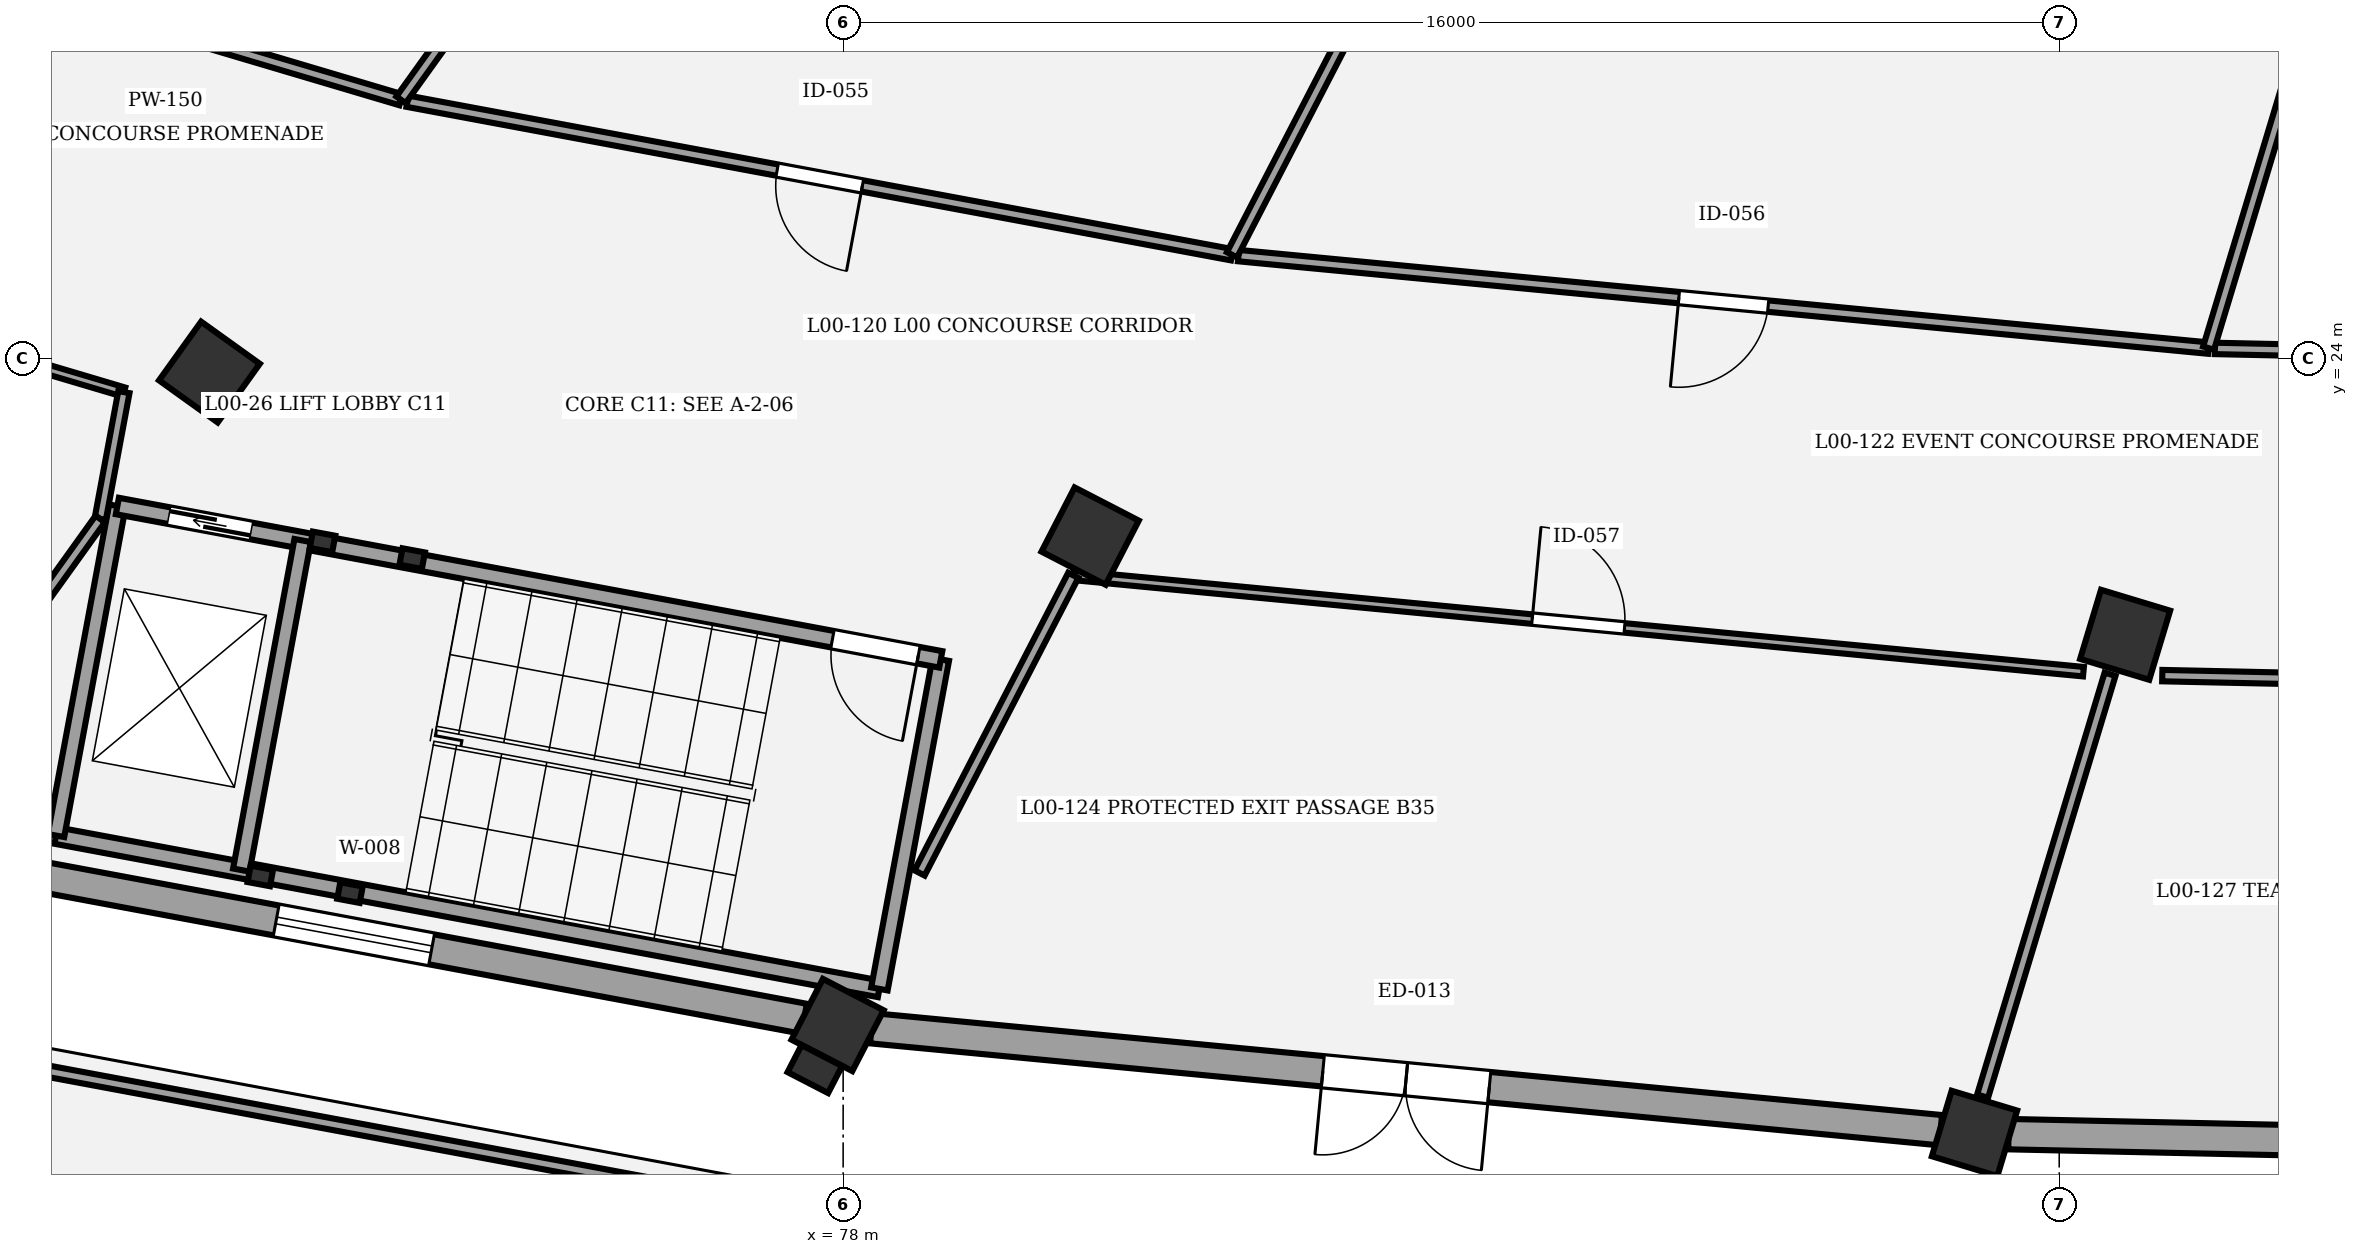
"""IFC4 building model, lengths in metres.
Left out: names, types, materials, properties, quantities, classifications, styles, units other than length and angle.
Written with IfcOpenShell. Run it as: python <this file> out.ifc"""

import sys

from ifc_helpers import new_model, si_unit, direction, frame, frame_2d, origin, origin_2d, place, context, subcontext, project, spatial, rectangle, extrude, element, fill, save


model = new_model("IFC4")
c1 = context("Model", 3, precision=1e-05, world=origin(), true_north=direction((0.0, 1.0)))
c2 = subcontext(c1, "Body", "Model", "MODEL_VIEW")
j1 = project(units=[si_unit("LENGTHUNIT", "METRE"), si_unit("PLANEANGLEUNIT", "RADIAN")], contexts=[c1])
p1 = place(None, origin())
s1 = spatial("IfcSite", under=j1, at=p1, CompositionType="ELEMENT")
p2 = place(p1, origin())
s2 = spatial("IfcBuilding", under=s1, at=p2, CompositionType="ELEMENT")
p3 = place(p2, origin())
s3 = spatial("IfcBuildingStorey", under=s2, at=p3, CompositionType="ELEMENT", Elevation=0.0)
for number, where, z_axis, x_axis in (
    (1, (69.662, 23.823, 0.0), (0.0, 0.0, 1.0), (-0.583, -0.812, 0.0)),
    (2, (81.25, 21.665, 0.0), (0.0, 0.0, 1.0), (-0.459, -0.888, 0.0)),
):
    element("IfcColumn", number, at=place(p3, frame(where, z_axis=z_axis, x_axis=x_axis)), inside=s3, PredefinedType="COLUMN", context=c2, shape_type="SweptSolid", body=[
        extrude(rectangle(XDim=0.95, YDim=0.95, at=origin_2d()), origin(), (0.0, 0.0, 1.0), 5.4),
    ])
p4 = place(p3, frame((77.927, 15.233, 0.0), z_axis=(0.0, 0.0, 1.0), x_axis=(-0.458959712465, -0.888457079624, 0.0)))
e3 = element("IfcColumn", 3, at=p4, inside=s3, PredefinedType="COLUMN", context=c2, shape_type="SweptSolid", body=[
    extrude(rectangle(XDim=0.9, YDim=0.9, at=origin_2d()), origin(), (0.0, 0.0, 1.0), 5.4),
])
p5 = place(p3, frame((77.627, 14.652, 0.0), z_axis=(0.0, 0.0, 1.0), x_axis=(0.888457079624, -0.458959712465, 0.0)))
e4 = element("IfcColumn", 4, at=p5, inside=s3, PredefinedType="PILASTER", context=c2, shape_type="SweptSolid", body=[
    extrude(rectangle(XDim=0.6, YDim=0.4, at=origin_2d()), origin(), (0.0, 0.0, 1.0), 5.4),
])
p6 = place(p3, frame((94.867, 20.366, 0.0), z_axis=(0.0, 0.0, 1.0), x_axis=(-0.289198876314, -0.957269037387, 0.0)))
e5 = element("IfcColumn", 5, at=p6, inside=s3, PredefinedType="COLUMN", context=c2, shape_type="SweptSolid", body=[
    extrude(rectangle(XDim=0.95, YDim=0.95, at=origin_2d()), origin(), (0.0, 0.0, 1.0), 5.4),
])
p7 = place(p3, frame((92.885, 13.806, 0.0), z_axis=(0.0, 0.0, 1.0), x_axis=(-0.289198876314, -0.957269037387, 0.0)))
e6 = element("IfcColumn", 6, at=p7, inside=s3, PredefinedType="COLUMN", context=c2, shape_type="SweptSolid", body=[
    extrude(rectangle(XDim=0.9, YDim=0.9, at=origin_2d()), origin(), (0.0, 0.0, 1.0), 5.4),
])
p8 = place(p3, frame((77.487, 15.315, 0.0), z_axis=(0.0, 0.0, 1.0), x_axis=(-0.983098943476, 0.183075031985, 0.0)))
e7 = element("IfcWall", 7, at=p8, inside=s3, PredefinedType="STANDARD", context=c2, shape_type="SweptSolid", body=[
    extrude(rectangle(XDim=12.051, YDim=0.4, at=frame_2d((6.026, 0.0))), origin(), (0.0, 0.0, 1.0), 4.25),
])
p9 = place(p8, frame((4.986, 0.0, 1.1)))
e8 = element("IfcOpeningElement", 8, at=p9, cuts=e7, PredefinedType="OPENING", context=c2, shape_type="SweptSolid", body=[
    extrude(rectangle(XDim=2.08, YDim=1.55, at=frame_2d((1.04, 0.775))), frame((0.0, 0.21, 0.0), z_axis=(0.0, -1.0, 0.0), x_axis=(1.0, 0.0, 0.0)), (0.0, 0.0, 1.0), 0.42),
])
p10 = place(p3, frame((92.439, 13.849, 0.0), z_axis=(0.0, 0.0, 1.0), x_axis=(-0.995482650467, 0.094943628644, 0.0)))
e9 = element("IfcWall", 9, at=p10, inside=s3, PredefinedType="STANDARD", context=c2, shape_type="SweptSolid", body=[
    extrude(rectangle(XDim=14.13, YDim=0.4, at=frame_2d((7.065, 0.0))), origin(), (0.0, 0.0, 1.0), 4.25),
])
p11 = place(p10, frame((5.965, 0.0, 0.0)))
e10 = element("IfcOpeningElement", 10, at=p11, cuts=e9, PredefinedType="OPENING", context=c2, shape_type="SweptSolid", body=[
    extrude(rectangle(XDim=2.2, YDim=2.5, at=frame_2d((1.1, 1.25))), frame((0.0, 0.21, 0.0), z_axis=(0.0, -1.0, 0.0), x_axis=(1.0, 0.0, 0.0)), (0.0, 0.0, 1.0), 0.42),
])
p12 = place(p3, frame((114.552, 13.34, 0.0), z_axis=(0.0, 0.0, 1.0), x_axis=(-0.999768115817, 0.021534033422, 0.0)))
e11 = element("IfcWall", 11, at=p12, inside=s3, PredefinedType="STANDARD", context=c2, shape_type="SweptSolid", body=[
    extrude(rectangle(XDim=21.224, YDim=0.4, at=frame_2d((10.612, 0.0))), origin(), (0.0, 0.0, 1.0), 4.25),
])
p13 = place(p12, frame((9.412, 0.0, 0.0)))
e12 = element("IfcOpeningElement", 12, at=p13, cuts=e11, PredefinedType="OPENING", context=c2, shape_type="SweptSolid", body=[
    extrude(rectangle(XDim=2.4, YDim=2.55, at=frame_2d((1.2, 1.275))), frame((0.0, 0.21, 0.0), z_axis=(0.0, -1.0, 0.0), x_axis=(1.0, 0.0, 0.0)), (0.0, 0.0, 1.0), 0.42),
])
for number, where, z_axis, x_axis in (
    (13, (72.33, 21.369, 0.0), (0.0, 0.0, 1.0), (-0.983, 0.183, 0.0)),
    (14, (71.15, 21.588, 0.0), (0.0, 0.0, 1.0), (-0.983, 0.183, 0.0)),
    (15, (70.332, 17.194, 0.0), (0.0, 0.0, 1.0), (-0.983, 0.183, 0.0)),
    (16, (71.511, 16.974, 0.0), (0.0, 0.0, 1.0), (-0.983, 0.183, 0.0)),
):
    element("IfcColumn", number, at=place(p3, frame(where, z_axis=z_axis, x_axis=x_axis)), inside=s3, PredefinedType="COLUMN", context=c2, shape_type="SweptSolid", body=[
        extrude(rectangle(XDim=0.3, YDim=0.22, at=origin_2d()), origin(), (0.0, 0.0, 1.0), 5.4),
    ])
p14 = place(p3, frame((78.477, 15.707, 0.0), z_axis=(0.0, 0.0, 1.0), x_axis=(-0.983093434234, 0.183104613723, 0.0)))
e17 = element("IfcWall", 17, at=p14, inside=s3, PredefinedType="SHEAR", context=c2, shape_type="SweptSolid", body=[
    extrude(rectangle(XDim=11.02, YDim=0.22, at=frame_2d((5.51, 0.0))), origin(), (0.0, 0.0, 1.0), 5.15),
])
for number, where, z_axis, x_axis in (
    (18, (79.285, 20.043, 0.0), (0.0, 0.0, 1.0), (-0.183, -0.983, 0.0)),
    (19, (68.451, 22.061, 0.0), (0.0, 0.0, 1.0), (-0.183, -0.983, 0.0)),
):
    element("IfcWall", number, at=place(p3, frame(where, z_axis=z_axis, x_axis=x_axis)), inside=s3, PredefinedType="SHEAR", context=c2, shape_type="SweptSolid", body=[
        extrude(rectangle(XDim=4.41, YDim=0.22, at=frame_2d((2.205, 0.0))), origin(), (0.0, 0.0, 1.0), 5.15),
    ])
p15 = place(p3, frame((79.285, 20.043, 0.0), z_axis=(0.0, 0.0, 1.0), x_axis=(-0.983093434234, 0.183104613723, 0.0)))
e20 = element("IfcWall", 20, at=p15, inside=s3, PredefinedType="SHEAR", context=c2, shape_type="SweptSolid", body=[
    extrude(rectangle(XDim=11.02, YDim=0.22, at=frame_2d((5.51, 0.0))), origin(), (0.0, 0.0, 1.0), 5.15),
])
p16 = place(p15, frame((0.3, 0.0, 0.0)))
e21 = element("IfcOpeningElement", 21, at=p16, cuts=e20, PredefinedType="OPENING", context=c2, shape_type="SweptSolid", body=[
    extrude(rectangle(XDim=1.15, YDim=2.15, at=frame_2d((0.575, 1.075))), frame((0.0, 0.12, 0.0), z_axis=(0.0, -1.0, 0.0), x_axis=(1.0, 0.0, 0.0)), (0.0, 0.0, 1.0), 0.24),
])
p17 = place(p15, frame((9.23, 0.0, 0.0)))
e22 = element("IfcOpeningElement", 22, at=p17, cuts=e20, PredefinedType="OPENING", context=c2, shape_type="SweptSolid", body=[
    extrude(rectangle(XDim=1.1, YDim=2.15, at=frame_2d((0.55, 1.075))), frame((0.0, 0.12, 0.0), z_axis=(0.0, -1.0, 0.0), x_axis=(1.0, 0.0, 0.0)), (0.0, 0.0, 1.0), 0.24),
])
p18 = place(p3, frame((70.889, 21.606, 0.0), z_axis=(0.0, 0.0, 1.0), x_axis=(-0.183078394814, -0.983098317236, 0.0)))
e23 = element("IfcWall", 23, at=p18, inside=s3, PredefinedType="SHEAR", context=c2, shape_type="SweptSolid", body=[
    extrude(rectangle(XDim=4.41, YDim=0.22, at=frame_2d((2.205, 0.0))), origin(), (0.0, 0.0, 1.0), 5.15),
])
p19 = place(p3, frame((72.183, 27.404, 0.0), z_axis=(0.0, 0.0, 1.0), x_axis=(-0.958655809656, 0.284568161629, 0.0)))
e24 = element("IfcWall", 24, at=p19, inside=s3, PredefinedType="PARTITIONING", context=c2, shape_type="SweptSolid", body=[
    extrude(rectangle(XDim=9.891, YDim=0.15, at=frame_2d((4.946, 0.0))), origin(), (0.0, 0.0, 1.0), 4.15),
])
p20 = place(p19, frame((5.644, 0.0, 0.0)))
e25 = element("IfcOpeningElement", 25, at=p20, cuts=e24, PredefinedType="OPENING", context=c2, shape_type="SweptSolid", body=[
    extrude(rectangle(XDim=1.06, YDim=2.2, at=frame_2d((0.53, 1.1))), frame((0.0, 0.085, 0.0), z_axis=(0.0, -1.0, 0.0), x_axis=(1.0, 0.0, 0.0)), (0.0, 0.0, 1.0), 0.17),
])
p21 = place(p3, frame((59.134, 26.35, 0.0), z_axis=(0.0, 0.0, 1.0), x_axis=(0.958661401763, -0.284549322211, 0.0)))
e26 = element("IfcWall", 26, at=p21, inside=s3, PredefinedType="PARTITIONING", context=c2, shape_type="SweptSolid", body=[
    extrude(rectangle(XDim=9.809, YDim=0.125, at=frame_2d((4.904, 0.0))), origin(), (0.0, 0.0, 1.0), 4.15),
])
p22 = place(p21, frame((5.564, 0.0, 0.0)))
e27 = element("IfcOpeningElement", 27, at=p22, cuts=e26, PredefinedType="OPENING", context=c2, shape_type="SweptSolid", body=[
    extrude(rectangle(XDim=1.1, YDim=2.2, at=frame_2d((0.55, 1.1))), frame((0.0, 0.073, 0.0), z_axis=(0.0, -1.0, 0.0), x_axis=(1.0, 0.0, 0.0)), (0.0, 0.0, 1.0), 0.145),
])
p23 = place(p3, frame((83.116, 25.365, 0.0), z_axis=(0.0, 0.0, 1.0), x_axis=(-0.983097372707, 0.183083466695, 0.0)))
e28 = element("IfcWall", 28, at=p23, inside=s3, PredefinedType="PARTITIONING", context=c2, shape_type="SweptSolid", body=[
    extrude(rectangle(XDim=11.035, YDim=0.15, at=frame_2d((5.517, 0.0))), origin(), (0.0, 0.0, 1.0), 4.15),
])
p24 = place(p23, frame((4.947, 0.0, 0.0)))
e29 = element("IfcOpeningElement", 29, at=p24, cuts=e28, PredefinedType="OPENING", context=c2, shape_type="SweptSolid", body=[
    extrude(rectangle(XDim=1.14, YDim=2.2, at=frame_2d((0.57, 1.1))), frame((0.0, 0.085, 0.0), z_axis=(0.0, -1.0, 0.0), x_axis=(1.0, 0.0, 0.0)), (0.0, 0.0, 1.0), 0.17),
])
p25 = place(p3, frame((95.965, 24.138, 0.0), z_axis=(0.0, 0.0, 1.0), x_axis=(-0.995485111947, 0.094917816515, 0.0)))
e30 = element("IfcWall", 30, at=p25, inside=s3, PredefinedType="PARTITIONING", context=c2, shape_type="SweptSolid", body=[
    extrude(rectangle(XDim=12.822, YDim=0.15, at=frame_2d((6.411, 0.0))), origin(), (0.0, 0.0, 1.0), 4.15),
])
p26 = place(p25, frame((5.821, 0.0, 0.0)))
e31 = element("IfcOpeningElement", 31, at=p26, cuts=e30, PredefinedType="OPENING", context=c2, shape_type="SweptSolid", body=[
    extrude(rectangle(XDim=1.18, YDim=2.2, at=frame_2d((0.59, 1.1))), frame((0.0, 0.085, 0.0), z_axis=(0.0, -1.0, 0.0), x_axis=(1.0, 0.0, 0.0)), (0.0, 0.0, 1.0), 0.17),
])
p27 = place(p3, frame((81.028, 21.148, 0.0), z_axis=(0.0, 0.0, 1.0), x_axis=(0.995484535327, -0.094923863827, 0.0)))
e32 = element("IfcWall", 32, at=p27, inside=s3, PredefinedType="PARTITIONING", context=c2, shape_type="SweptSolid", body=[
    extrude(rectangle(XDim=13.351, YDim=0.125, at=frame_2d((6.676, 0.0))), origin(), (0.0, 0.0, 1.0), 4.15),
])
p28 = place(p27, frame((6.065, 0.0, 0.0)))
e33 = element("IfcOpeningElement", 33, at=p28, cuts=e32, PredefinedType="OPENING", context=c2, shape_type="SweptSolid", body=[
    extrude(rectangle(XDim=1.22, YDim=2.2, at=frame_2d((0.61, 1.1))), frame((0.0, 0.073, 0.0), z_axis=(0.0, -1.0, 0.0), x_axis=(1.0, 0.0, 0.0)), (0.0, 0.0, 1.0), 0.145),
])
p29 = place(p3, frame((114.96, 23.726, 0.0), z_axis=(0.0, 0.0, 1.0), x_axis=(-0.999768266483, 0.021527037261, 0.0)))
e34 = element("IfcWall", 34, at=p29, inside=s3, PredefinedType="PARTITIONING", context=c2, shape_type="SweptSolid", body=[
    extrude(rectangle(XDim=18.917, YDim=0.15, at=frame_2d((9.458, 0.0))), origin(), (0.0, 0.0, 1.0), 4.15),
])
p30 = place(p29, frame((8.829, 0.0, 0.0)))
e35 = element("IfcOpeningElement", 35, at=p30, cuts=e34, PredefinedType="OPENING", context=c2, shape_type="SweptSolid", body=[
    extrude(rectangle(XDim=1.26, YDim=2.2, at=frame_2d((0.63, 1.1))), frame((0.0, 0.085, 0.0), z_axis=(0.0, -1.0, 0.0), x_axis=(1.0, 0.0, 0.0)), (0.0, 0.0, 1.0), 0.17),
])
p31 = place(p3, frame((95.356, 19.829, 0.0), z_axis=(0.0, 0.0, 1.0), x_axis=(0.999768107727, -0.021534409017, 0.0)))
e36 = element("IfcWall", 36, at=p31, inside=s3, PredefinedType="PARTITIONING", context=c2, shape_type="SweptSolid", body=[
    extrude(rectangle(XDim=19.137, YDim=0.15, at=frame_2d((9.569, 0.0))), origin(), (0.0, 0.0, 1.0), 4.15),
])
p32 = place(p31, frame((8.909, 0.0, 0.0)))
e37 = element("IfcOpeningElement", 37, at=p32, cuts=e36, PredefinedType="OPENING", context=c2, shape_type="SweptSolid", body=[
    extrude(rectangle(XDim=1.32, YDim=2.2, at=frame_2d((0.66, 1.1))), frame((0.0, 0.085, 0.0), z_axis=(0.0, -1.0, 0.0), x_axis=(1.0, 0.0, 0.0)), (0.0, 0.0, 1.0), 0.17),
])
p33 = place(p3, frame((79.933, 38.204, 0.0), z_axis=(0.0, 0.0, 1.0), x_axis=(-0.583015953896, -0.812460705205, 0.0)))
e38 = element("IfcWall", 38, at=p33, inside=s3, PredefinedType="PARTITIONING", context=c2, shape_type="SweptSolid", body=[
    extrude(rectangle(XDim=13.292, YDim=0.15, at=frame_2d((6.646, 0.0))), origin(), (0.0, 0.0, 1.0), 4.15),
])
p34 = place(p3, frame((68.537, 23.559, 0.0), z_axis=(0.0, 0.0, 1.0), x_axis=(-0.183185863857, -0.983078297636, 0.0)))
e39 = element("IfcWall", 39, at=p34, inside=s3, PredefinedType="PARTITIONING", context=c2, shape_type="SweptSolid", body=[
    extrude(rectangle(XDim=1.698, YDim=0.15, at=frame_2d((0.849, 0.0))), origin(), (0.0, 0.0, 1.0), 4.15),
])
p35 = place(p3, frame((68.226, 21.89, 0.0), z_axis=(0.0, 0.0, 1.0), x_axis=(-0.583007019162, -0.812467116632, 0.0)))
e40 = element("IfcWall", 40, at=p35, inside=s3, PredefinedType="PARTITIONING", context=c2, shape_type="SweptSolid", body=[
    extrude(rectangle(XDim=4.736, YDim=0.15, at=frame_2d((2.368, 0.0))), origin(), (0.0, 0.0, 1.0), 4.15),
])
p36 = place(p3, frame((88.884, 36.53, 0.0), z_axis=(0.0, 0.0, 1.0), x_axis=(-0.45894823356, -0.88846300931, 0.0)))
e41 = element("IfcWall", 41, at=p36, inside=s3, PredefinedType="PARTITIONING", context=c2, shape_type="SweptSolid", body=[
    extrude(rectangle(XDim=12.566, YDim=0.15, at=frame_2d((6.283, 0.0))), origin(), (0.0, 0.0, 1.0), 4.15),
])
p37 = place(p3, frame((99.405, 35.522, 0.0), z_axis=(0.0, 0.0, 1.0), x_axis=(-0.289230709122, -0.957259419855, 0.0)))
e42 = element("IfcWall", 42, at=p37, inside=s3, PredefinedType="PARTITIONING", context=c2, shape_type="SweptSolid", body=[
    extrude(rectangle(XDim=11.893, YDim=0.15, at=frame_2d((5.946, 0.0))), origin(), (0.0, 0.0, 1.0), 4.15),
])
p38 = place(p3, frame((79.006, 17.233, 0.0), z_axis=(0.0, 0.0, 1.0), x_axis=(0.458942068402, 0.888466193983, 0.0)))
e43 = element("IfcWall", 43, at=p38, inside=s3, PredefinedType="PARTITIONING", context=c2, shape_type="SweptSolid", body=[
    extrude(rectangle(XDim=4.407, YDim=0.15, at=frame_2d((2.203, 0.0))), origin(), (0.0, 0.0, 1.0), 4.15),
])
p39 = place(p3, frame((94.669, 19.847, 0.0), z_axis=(0.0, 0.0, 1.0), x_axis=(-0.289236092688, -0.957257793223, 0.0)))
e44 = element("IfcWall", 44, at=p39, inside=s3, PredefinedType="PARTITIONING", context=c2, shape_type="SweptSolid", body=[
    extrude(rectangle(XDim=5.799, YDim=0.15, at=frame_2d((2.899, 0.0))), origin(), (0.0, 0.0, 1.0), 4.15),
])
p40 = place(p3, frame((64.741, 15.146, 0.0), z_axis=(0.0, 0.0, 1.0), x_axis=(0.983094545276, -0.183098648406, 0.0)))
e45 = element("IfcWall", 45, at=p40, inside=s3, PredefinedType="PARTITIONING", context=c2, shape_type="SweptSolid", body=[
    extrude(rectangle(XDim=12.947, YDim=0.15, at=frame_2d((6.474, 0.0))), origin(), (0.0, 0.0, 1.0), 4.15),
])
p41 = place(p9, origin())
e46 = element("IfcWindow", 46, at=p41, inside=s3, PartitioningType="SINGLE_PANEL", PredefinedType="WINDOW", context=c2, shape_type="SweptSolid", body=[
    extrude(rectangle(XDim=2.08, YDim=1.55, at=frame_2d((1.04, 0.775))), frame((0.0, 0.03, 0.0), z_axis=(0.0, -1.0, 0.0), x_axis=(1.0, 0.0, 0.0)), (0.0, 0.0, 1.0), 0.06),
])
fill(e8, e46)
p42 = place(p11, origin())
e47 = element("IfcDoor", 47, at=p42, inside=s3, OperationType="DOUBLE_DOOR_SINGLE_SWING", PredefinedType="DOOR", context=c2, shape_type="SweptSolid", body=[
    extrude(rectangle(XDim=2.2, YDim=2.5, at=frame_2d((1.1, 1.25))), frame((0.0, 0.025, 0.0), z_axis=(0.0, -1.0, 0.0), x_axis=(1.0, 0.0, 0.0)), (0.0, 0.0, 1.0), 0.05),
])
fill(e10, e47)
p43 = place(p16, origin())
e48 = element("IfcDoor", 48, at=p43, inside=s3, OperationType="SINGLE_SWING_LEFT", PredefinedType="DOOR", context=c2, shape_type="SweptSolid", body=[
    extrude(rectangle(XDim=1.15, YDim=2.15, at=frame_2d((0.575, 1.075))), frame((0.0, 0.025, 0.0), z_axis=(0.0, -1.0, 0.0), x_axis=(1.0, 0.0, 0.0)), (0.0, 0.0, 1.0), 0.05),
])
fill(e21, e48)
p44 = place(p17, origin())
e49 = element("IfcDoor", 49, at=p44, inside=s3, OperationType="DOUBLE_DOOR_SLIDING", PredefinedType="DOOR", context=c2, shape_type="SweptSolid", body=[
    extrude(rectangle(XDim=1.1, YDim=2.15, at=frame_2d((0.55, 1.075))), frame((0.0, 0.025, 0.0), z_axis=(0.0, -1.0, 0.0), x_axis=(1.0, 0.0, 0.0)), (0.0, 0.0, 1.0), 0.05),
])
fill(e22, e49)
p45 = place(p24, origin())
e50 = element("IfcDoor", 50, at=p45, inside=s3, OperationType="SINGLE_SWING_LEFT", PredefinedType="DOOR", context=c2, shape_type="SweptSolid", body=[
    extrude(rectangle(XDim=1.14, YDim=2.2, at=frame_2d((0.57, 1.1))), frame((0.0, 0.025, 0.0), z_axis=(0.0, -1.0, 0.0), x_axis=(1.0, 0.0, 0.0)), (0.0, 0.0, 1.0), 0.05),
])
fill(e29, e50)
p46 = place(p26, origin())
e51 = element("IfcDoor", 51, at=p46, inside=s3, OperationType="SINGLE_SWING_RIGHT", PredefinedType="DOOR", context=c2, shape_type="SweptSolid", body=[
    extrude(rectangle(XDim=1.18, YDim=2.2, at=frame_2d((0.59, 1.1))), frame((0.0, 0.025, 0.0), z_axis=(0.0, -1.0, 0.0), x_axis=(1.0, 0.0, 0.0)), (0.0, 0.0, 1.0), 0.05),
])
fill(e31, e51)
p47 = place(p28, origin())
e52 = element("IfcDoor", 52, at=p47, inside=s3, OperationType="SINGLE_SWING_LEFT", PredefinedType="DOOR", context=c2, shape_type="SweptSolid", body=[
    extrude(rectangle(XDim=1.22, YDim=2.2, at=frame_2d((0.61, 1.1))), frame((0.0, 0.025, 0.0), z_axis=(0.0, -1.0, 0.0), x_axis=(1.0, 0.0, 0.0)), (0.0, 0.0, 1.0), 0.05),
])
fill(e33, e52)
save(model, sys.argv[1])
